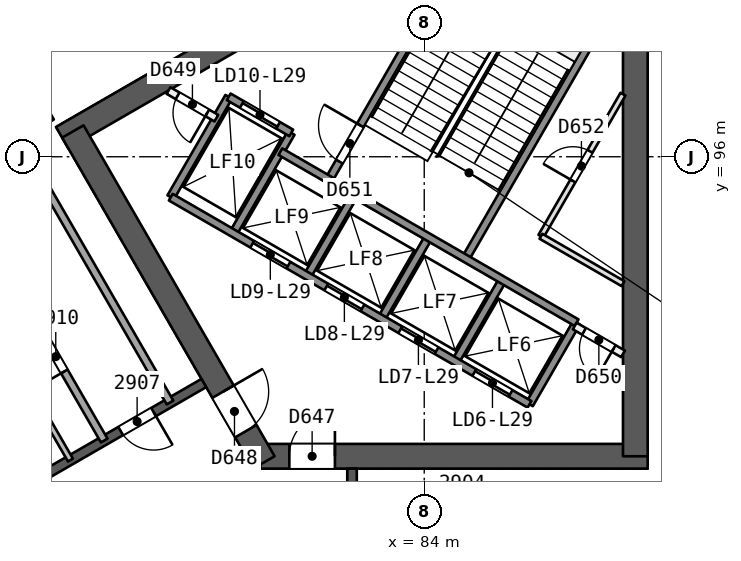
"""IFC4 building model, lengths in metres.
Left out: names, types, materials, properties, quantities, classifications, styles, units other than length and angle.
Written with IfcOpenShell. Run it as: python <this file> out.ifc"""

import sys

from ifc_helpers import new_model, si_unit, direction, frame, frame_2d, origin, place, context, subcontext, project, spatial, rectangle, extrude, element, fill, save


model = new_model("IFC4")
c1 = context("Model", 3, precision=1e-05, world=origin(), true_north=direction((0.0, 1.0)))
c2 = subcontext(c1, "Body", "Model", "MODEL_VIEW")
j1 = project(units=[si_unit("LENGTHUNIT", "METRE"), si_unit("PLANEANGLEUNIT", "RADIAN")], contexts=[c1])
p1 = place(None, origin())
s1 = spatial("IfcSite", under=j1, at=p1, CompositionType="ELEMENT")
p2 = place(p1, origin())
s2 = spatial("IfcBuilding", under=s1, at=p2, CompositionType="ELEMENT")
p3 = place(p2, frame((0.0, 0.0, 121.6)))
s3 = spatial("IfcBuildingStorey", under=s2, at=p3, CompositionType="ELEMENT", Elevation=121.6)
p4 = place(p3, frame((79.688, 88.119, 0.0), z_axis=(0.0, 0.0, 1.0), x_axis=(1.0, 0.0, 0.0)))
e1 = element("IfcWall", 1, at=p4, inside=s3, PredefinedType="SHEAR", context=c2, shape_type="SweptSolid", body=[
    extrude(rectangle(XDim=10.192, YDim=0.65, at=frame_2d((5.096, 0.0))), origin(), (0.0, 0.0, 1.0), 3.7),
])
p5 = place(p4, frame((0.762, 0.0, 0.0)))
e2 = element("IfcOpeningElement", 2, at=p5, cuts=e1, PredefinedType="OPENING", context=c2, shape_type="SweptSolid", body=[
    extrude(rectangle(XDim=1.2, YDim=2.1, at=frame_2d((0.6, 1.05))), frame((0.0, 0.335, 0.0), z_axis=(0.0, -1.0, 0.0), x_axis=(1.0, 0.0, 0.0)), (0.0, 0.0, 1.0), 0.671),
])
p6 = place(p3, frame((89.555, 88.119, 0.0), z_axis=(0.0, 0.0, 1.0), x_axis=(0.0, 1.0, 0.0)))
e3 = element("IfcWall", 3, at=p6, inside=s3, PredefinedType="SHEAR", context=c2, shape_type="SweptSolid", body=[
    extrude(rectangle(XDim=14.009, YDim=0.65, at=frame_2d((7.004, 0.0))), origin(), (0.0, 0.0, 1.0), 3.7),
])
p7 = place(p3, frame((86.723, 103.575, 0.0), z_axis=(0.0, 0.0, 1.0), x_axis=(-0.866031824457, -0.499988878904, 0.0)))
e4 = element("IfcWall", 4, at=p7, inside=s3, PredefinedType="SHEAR", context=c2, shape_type="SweptSolid", body=[
    extrude(rectangle(XDim=14.146, YDim=0.65, at=frame_2d((7.073, 0.0))), origin(), (0.0, 0.0, 1.0), 3.7),
])
p8 = place(p3, frame((74.754, 96.665, 0.0), z_axis=(0.0, 0.0, 1.0), x_axis=(0.500011799426, -0.866018591275, 0.0)))
e5 = element("IfcWall", 5, at=p8, inside=s3, PredefinedType="SHEAR", context=c2, shape_type="SweptSolid", body=[
    extrude(rectangle(XDim=10.055, YDim=0.65, at=frame_2d((5.027, 0.0))), origin(), (0.0, 0.0, 1.0), 3.7),
])
p9 = place(p8, frame((7.905, 0.0, 0.0)))
e6 = element("IfcOpeningElement", 6, at=p9, cuts=e5, PredefinedType="OPENING", context=c2, shape_type="SweptSolid", body=[
    extrude(rectangle(XDim=1.2, YDim=2.1, at=frame_2d((0.6, 1.05))), frame((0.0, 0.335, 0.0), z_axis=(0.0, -1.0, 0.0), x_axis=(1.0, 0.0, 0.0)), (0.0, 0.0, 1.0), 0.671),
])
p10 = place(p3, frame((82.1, 72.206, 0.0), z_axis=(0.0, 0.0, 1.0), x_axis=(0.0, 1.0, 0.0)))
e7 = element("IfcWall", 7, at=p10, inside=s3, PredefinedType="SHEAR", context=c2, shape_type="SweptSolid", body=[
    extrude(rectangle(XDim=15.588, YDim=0.25, at=frame_2d((7.794, 0.0))), origin(), (0.0, 0.0, 1.0), 3.25),
])
p11 = place(p10, frame((2.206, 0.0, 0.0)))
e8 = element("IfcOpeningElement", 8, at=p11, cuts=e7, PredefinedType="OPENING", context=c2, shape_type="SweptSolid", body=[
    extrude(rectangle(XDim=1.2, YDim=2.4, at=frame_2d((0.6, 1.2))), frame((0.0, 0.135, 0.0), z_axis=(0.0, -1.0, 0.0), x_axis=(1.0, 0.0, 0.0)), (0.0, 0.0, 1.0), 0.271),
])
p12 = place(p10, frame((8.003, 0.0, 0.0)))
e9 = element("IfcOpeningElement", 9, at=p12, cuts=e7, PredefinedType="OPENING", context=c2, shape_type="SweptSolid", body=[
    extrude(rectangle(XDim=1.1, YDim=2.1, at=frame_2d((0.55, 1.05))), frame((0.0, 0.135, 0.0), z_axis=(0.0, -1.0, 0.0), x_axis=(1.0, 0.0, 0.0)), (0.0, 0.0, 1.0), 0.271),
])
p13 = place(p10, frame((9.871, 0.0, 0.0)))
e10 = element("IfcOpeningElement", 10, at=p13, cuts=e7, PredefinedType="OPENING", context=c2, shape_type="SweptSolid", body=[
    extrude(rectangle(XDim=1.0, YDim=2.1, at=frame_2d((0.5, 1.05))), frame((0.0, 0.135, 0.0), z_axis=(0.0, -1.0, 0.0), x_axis=(1.0, 0.0, 0.0)), (0.0, 0.0, 1.0), 0.271),
])
p14 = place(p3, frame((78.2, 90.046, 0.0), z_axis=(0.0, 0.0, 1.0), x_axis=(-0.866026492143, -0.499998114903, 0.0)))
e11 = element("IfcWall", 11, at=p14, inside=s3, PredefinedType="SHEAR", context=c2, shape_type="SweptSolid", body=[
    extrude(rectangle(XDim=15.588, YDim=0.25, at=frame_2d((7.794, 0.0))), origin(), (0.0, 0.0, 1.0), 3.25),
])
p15 = place(p14, frame((1.527, 0.0, 0.0)))
e12 = element("IfcOpeningElement", 12, at=p15, cuts=e11, PredefinedType="OPENING", context=c2, shape_type="SweptSolid", body=[
    extrude(rectangle(XDim=1.0, YDim=2.1, at=frame_2d((0.5, 1.05))), frame((0.0, 0.135, 0.0), z_axis=(0.0, -1.0, 0.0), x_axis=(1.0, 0.0, 0.0)), (0.0, 0.0, 1.0), 0.271),
])
p16 = place(p14, frame((8.694, 0.0, 0.0)))
e13 = element("IfcOpeningElement", 13, at=p16, cuts=e11, PredefinedType="OPENING", context=c2, shape_type="SweptSolid", body=[
    extrude(rectangle(XDim=1.1, YDim=2.1, at=frame_2d((0.55, 1.05))), frame((0.0, 0.135, 0.0), z_axis=(0.0, -1.0, 0.0), x_axis=(1.0, 0.0, 0.0)), (0.0, 0.0, 1.0), 0.271),
])
p17 = place(p14, frame((13.062, 0.0, 0.0)))
e14 = element("IfcOpeningElement", 14, at=p17, cuts=e11, PredefinedType="OPENING", context=c2, shape_type="SweptSolid", body=[
    extrude(rectangle(XDim=1.0, YDim=2.1, at=frame_2d((0.5, 1.05))), frame((0.0, 0.135, 0.0), z_axis=(0.0, -1.0, 0.0), x_axis=(1.0, 0.0, 0.0)), (0.0, 0.0, 1.0), 0.271),
])
p18 = place(p3, frame((85.0, 87.595, 0.0), z_axis=(0.0, 0.0, 1.0), x_axis=(0.0, -1.0, 0.0)))
e15 = element("IfcWall", 15, at=p18, inside=s3, PredefinedType="PARTITIONING", context=c2, shape_type="SweptSolid", body=[
    extrude(rectangle(XDim=2.401, YDim=0.15, at=frame_2d((1.2, 0.0))), origin(), (0.0, 0.0, 1.0), 3.25),
])
p19 = place(p18, frame((0.801, 0.0, 0.0)))
e16 = element("IfcOpeningElement", 16, at=p19, cuts=e15, PredefinedType="OPENING", context=c2, shape_type="SweptSolid", body=[
    extrude(rectangle(XDim=0.8, YDim=2.1, at=frame_2d((0.4, 1.05))), frame((0.0, 0.085, 0.0), z_axis=(0.0, -1.0, 0.0), x_axis=(1.0, 0.0, 0.0)), (0.0, 0.0, 1.0), 0.171),
])
p20 = place(p3, frame((74.21, 96.956, 0.0), z_axis=(0.0, 0.0, 1.0), x_axis=(-0.499956595832, 0.866050461743, 0.0)))
e17 = element("IfcWall", 17, at=p20, inside=s3, PredefinedType="PARTITIONING", context=c2, shape_type="SweptSolid", body=[
    extrude(rectangle(XDim=4.423, YDim=0.1, at=frame_2d((2.211, 0.0))), origin(), (0.0, 0.0, 1.0), 3.25),
])
p21 = place(p20, frame((1.761, 0.0, 0.0)))
e18 = element("IfcOpeningElement", 18, at=p21, cuts=e17, PredefinedType="OPENING", context=c2, shape_type="SweptSolid", body=[
    extrude(rectangle(XDim=0.9, YDim=2.1, at=frame_2d((0.45, 1.05))), frame((0.0, 0.061, 0.0), z_axis=(0.0, -1.0, 0.0), x_axis=(1.0, 0.0, 0.0)), (0.0, 0.0, 1.0), 0.121),
])
p22 = place(p3, frame((75.579, 88.533, 0.0), z_axis=(0.0, 0.0, 1.0), x_axis=(-0.5000018851, 0.866024315419, 0.0)))
e19 = element("IfcWall", 19, at=p22, inside=s3, PredefinedType="PARTITIONING", context=c2, shape_type="SweptSolid", body=[
    extrude(rectangle(XDim=9.0, YDim=0.2, at=frame_2d((4.5, 0.0))), origin(), (0.0, 0.0, 1.0), 3.25),
])
p23 = place(p22, frame((2.1, 0.0, 0.0)))
e20 = element("IfcOpeningElement", 20, at=p23, cuts=e19, PredefinedType="OPENING", context=c2, shape_type="SweptSolid", body=[
    extrude(rectangle(XDim=0.9, YDim=2.1, at=frame_2d((0.45, 1.05))), frame((0.0, 0.11, 0.0), z_axis=(0.0, -1.0, 0.0), x_axis=(1.0, 0.0, 0.0)), (0.0, 0.0, 1.0), 0.221),
])
p24 = place(p3, frame((72.811, 97.327, 0.0), z_axis=(0.0, 0.0, 1.0), x_axis=(0.5000018851, -0.866024315419, 0.0)))
e21 = element("IfcWall", 21, at=p24, inside=s3, PredefinedType="PARTITIONING", context=c2, shape_type="SweptSolid", body=[
    extrude(rectangle(XDim=9.0, YDim=0.2, at=frame_2d((4.5, 0.0))), origin(), (0.0, 0.0, 1.0), 3.25),
])
p25 = place(p3, frame((73.19, 90.617, 0.0), z_axis=(0.0, 0.0, 1.0), x_axis=(0.499990139034, -0.866031096941, 0.0)))
e22 = element("IfcWall", 22, at=p25, inside=s3, PredefinedType="PARTITIONING", context=c2, shape_type="SweptSolid", body=[
    extrude(rectangle(XDim=3.0, YDim=0.15, at=frame_2d((1.5, 0.0))), origin(), (0.0, 0.0, 1.0), 3.25),
])
p26 = place(p3, frame((40.706, 82.891, 0.0), z_axis=(0.0, 0.0, 1.0), x_axis=(0.866024855185, 0.5000009502, 0.0)))
e23 = element("IfcWall", 23, at=p26, inside=s3, PredefinedType="SOLIDWALL", context=c2, shape_type="SweptSolid", body=[
    extrude(rectangle(XDim=56.508, YDim=0.3, at=frame_2d((28.254, 0.0))), origin(), (0.0, 0.0, 1.0), 3.25),
])
p27 = place(p26, frame((27.054, 0.0, 0.0)))
e24 = element("IfcOpeningElement", 24, at=p27, cuts=e23, PredefinedType="OPENING", context=c2, shape_type="SweptSolid", body=[
    extrude(rectangle(XDim=2.4, YDim=2.4, at=frame_2d((1.2, 1.2))), frame((0.0, 0.161, 0.0), z_axis=(0.0, -1.0, 0.0), x_axis=(1.0, 0.0, 0.0)), (0.0, 0.0, 1.0), 0.321),
])
p28 = place(p26, frame((32.822, 0.0, 0.0)))
e25 = element("IfcOpeningElement", 25, at=p28, cuts=e23, PredefinedType="OPENING", context=c2, shape_type="SweptSolid", body=[
    extrude(rectangle(XDim=2.4, YDim=2.4, at=frame_2d((1.2, 1.2))), frame((0.0, 0.161, 0.0), z_axis=(0.0, -1.0, 0.0), x_axis=(1.0, 0.0, 0.0)), (0.0, 0.0, 1.0), 0.321),
])
p29 = place(p26, frame((43.875, 0.0, 0.0)))
e26 = element("IfcOpeningElement", 26, at=p29, cuts=e23, PredefinedType="OPENING", context=c2, shape_type="SweptSolid", body=[
    extrude(rectangle(XDim=2.4, YDim=2.4, at=frame_2d((1.2, 1.2))), frame((0.0, 0.161, 0.0), z_axis=(0.0, -1.0, 0.0), x_axis=(1.0, 0.0, 0.0)), (0.0, 0.0, 1.0), 0.321),
])
p30 = place(p26, frame((21.286, 0.0, 0.0)))
e27 = element("IfcOpeningElement", 27, at=p30, cuts=e23, PredefinedType="OPENING", context=c2, shape_type="SweptSolid", body=[
    extrude(rectangle(XDim=2.4, YDim=2.4, at=frame_2d((1.2, 1.2))), frame((0.0, 0.161, 0.0), z_axis=(0.0, -1.0, 0.0), x_axis=(1.0, 0.0, 0.0)), (0.0, 0.0, 1.0), 0.321),
])
p31 = place(p26, frame((10.251, 0.0, 0.0)))
e28 = element("IfcOpeningElement", 28, at=p31, cuts=e23, PredefinedType="OPENING", context=c2, shape_type="SweptSolid", body=[
    extrude(rectangle(XDim=2.4, YDim=2.4, at=frame_2d((1.2, 1.2))), frame((0.0, 0.161, 0.0), z_axis=(0.0, -1.0, 0.0), x_axis=(1.0, 0.0, 0.0)), (0.0, 0.0, 1.0), 0.321),
])
p32 = place(p3, frame((86.77, 89.486, 0.0), z_axis=(0.0, 0.0, 1.0), x_axis=(0.499961042966, 0.86604789447, 0.0)))
e29 = element("IfcWall", 29, at=p32, inside=s3, PredefinedType="SOLIDWALL", context=c2, shape_type="SweptSolid", body=[
    extrude(rectangle(XDim=2.48, YDim=0.2, at=frame_2d((1.24, 0.0))), origin(), (0.0, 0.0, 1.0), 3.25),
])
p33 = place(p3, frame((87.071, 93.908, 0.0), z_axis=(0.0, 0.0, 1.0), x_axis=(0.500012861172, 0.866017978256, 0.0)))
e30 = element("IfcWall", 30, at=p33, inside=s3, PredefinedType="PARTITIONING", context=c2, shape_type="SweptSolid", body=[
    extrude(rectangle(XDim=4.318, YDim=0.15, at=frame_2d((2.159, 0.0))), origin(), (0.0, 0.0, 1.0), 3.25),
])
p34 = place(p33, frame((1.681, 0.0, 0.0)))
e31 = element("IfcOpeningElement", 31, at=p34, cuts=e30, PredefinedType="OPENING", context=c2, shape_type="SweptSolid", body=[
    extrude(rectangle(XDim=0.9, YDim=2.1, at=frame_2d((0.45, 1.05))), frame((0.0, 0.085, 0.0), z_axis=(0.0, -1.0, 0.0), x_axis=(1.0, 0.0, 0.0)), (0.0, 0.0, 1.0), 0.171),
])
p35 = place(p3, frame((84.821, 90.611, 0.0), z_axis=(0.0, 0.0, 1.0), x_axis=(0.499961042966, 0.86604789447, 0.0)))
e32 = element("IfcWall", 32, at=p35, inside=s3, PredefinedType="SOLIDWALL", context=c2, shape_type="SweptSolid", body=[
    extrude(rectangle(XDim=2.48, YDim=0.2, at=frame_2d((1.24, 0.0))), origin(), (0.0, 0.0, 1.0), 3.25),
])
p36 = place(p3, frame((85.087, 93.321, 0.0), z_axis=(0.0, 0.0, 1.0), x_axis=(0.500019787375, 0.866013979237, 0.0)))
e33 = element("IfcWall", 33, at=p36, inside=s3, PredefinedType="SOLIDWALL", context=c2, shape_type="SweptSolid", body=[
    extrude(rectangle(XDim=7.7, YDim=0.2, at=frame_2d((3.85, 0.0))), origin(), (0.0, 0.0, 1.0), 3.25),
])
for number, where, z_axis, x_axis in (
    (34, (82.873, 91.736, 0.0), (0.0, 0.0, 1.0), (0.5, 0.866, 0.0)),
    (35, (80.924, 92.861, 0.0), (0.0, 0.0, 1.0), (0.5, 0.866, 0.0)),
):
    element("IfcWall", number, at=place(p3, frame(where, z_axis=z_axis, x_axis=x_axis)), inside=s3, PredefinedType="SOLIDWALL", context=c2, shape_type="SweptSolid", body=[
        extrude(rectangle(XDim=2.48, YDim=0.2, at=frame_2d((1.24, 0.0))), origin(), (0.0, 0.0, 1.0), 3.25),
    ])
p37 = place(p3, frame((81.493, 95.396, 0.0), z_axis=(0.0, 0.0, 1.0), x_axis=(0.500006057782, 0.866021906294, 0.0)))
e36 = element("IfcWall", 36, at=p37, inside=s3, PredefinedType="SOLIDWALL", context=c2, shape_type="SweptSolid", body=[
    extrude(rectangle(XDim=7.7, YDim=0.2, at=frame_2d((3.85, 0.0))), origin(), (0.0, 0.0, 1.0), 3.25),
])
p38 = place(p37, frame((0.55, 0.0, 0.0)))
e37 = element("IfcOpeningElement", 37, at=p38, cuts=e36, PredefinedType="OPENING", context=c2, shape_type="SweptSolid", body=[
    extrude(rectangle(XDim=1.1, YDim=2.1, at=frame_2d((0.55, 1.05))), frame((0.0, 0.11, 0.0), z_axis=(0.0, -1.0, 0.0), x_axis=(1.0, 0.0, 0.0)), (0.0, 0.0, 1.0), 0.221),
])
for number, where, z_axis, x_axis in (
    (38, (78.976, 93.986, 0.0), (0.0, 0.0, 1.0), (0.5, 0.866, 0.0)),
    (39, (77.33, 94.936, 0.0), (0.0, 0.0, 1.0), (0.5, 0.866, 0.0)),
):
    element("IfcWall", number, at=place(p3, frame(where, z_axis=z_axis, x_axis=x_axis)), inside=s3, PredefinedType="SOLIDWALL", context=c2, shape_type="SweptSolid", body=[
        extrude(rectangle(XDim=3.05, YDim=0.2, at=frame_2d((1.525, 0.0))), origin(), (0.0, 0.0, 1.0), 3.25),
    ])
p39 = place(p3, frame((86.77, 89.486, 0.0), z_axis=(0.0, 0.0, 1.0), x_axis=(-0.86601811187, 0.500012629753, 0.0)))
e40 = element("IfcWall", 40, at=p39, inside=s3, PredefinedType="SOLIDWALL", context=c2, shape_type="SweptSolid", body=[
    extrude(rectangle(XDim=10.9, YDim=0.2, at=frame_2d((5.45, 0.0))), origin(), (0.0, 0.0, 1.0), 3.25),
])
p40 = place(p39, frame((0.575, 0.0, 0.0)))
e41 = element("IfcOpeningElement", 41, at=p40, cuts=e40, PredefinedType="OPENING", context=c2, shape_type="SweptSolid", body=[
    extrude(rectangle(XDim=1.1, YDim=2.1, at=frame_2d((0.55, 1.05))), frame((0.0, 0.11, 0.0), z_axis=(0.0, -1.0, 0.0), x_axis=(1.0, 0.0, 0.0)), (0.0, 0.0, 1.0), 0.221),
])
p41 = place(p39, frame((2.825, 0.0, 0.0)))
e42 = element("IfcOpeningElement", 42, at=p41, cuts=e40, PredefinedType="OPENING", context=c2, shape_type="SweptSolid", body=[
    extrude(rectangle(XDim=1.1, YDim=2.1, at=frame_2d((0.55, 1.05))), frame((0.0, 0.11, 0.0), z_axis=(0.0, -1.0, 0.0), x_axis=(1.0, 0.0, 0.0)), (0.0, 0.0, 1.0), 0.221),
])
p42 = place(p39, frame((5.075, 0.0, 0.0)))
e43 = element("IfcOpeningElement", 43, at=p42, cuts=e40, PredefinedType="OPENING", context=c2, shape_type="SweptSolid", body=[
    extrude(rectangle(XDim=1.1, YDim=2.1, at=frame_2d((0.55, 1.05))), frame((0.0, 0.11, 0.0), z_axis=(0.0, -1.0, 0.0), x_axis=(1.0, 0.0, 0.0)), (0.0, 0.0, 1.0), 0.221),
])
p43 = place(p39, frame((7.325, 0.0, 0.0)))
e44 = element("IfcOpeningElement", 44, at=p43, cuts=e40, PredefinedType="OPENING", context=c2, shape_type="SweptSolid", body=[
    extrude(rectangle(XDim=1.1, YDim=2.1, at=frame_2d((0.55, 1.05))), frame((0.0, 0.11, 0.0), z_axis=(0.0, -1.0, 0.0), x_axis=(1.0, 0.0, 0.0)), (0.0, 0.0, 1.0), 0.221),
])
p44 = place(p3, frame((89.23, 90.814, 0.0), z_axis=(0.0, 0.0, 1.0), x_axis=(-0.866022048785, 0.500005810984, 0.0)))
e45 = element("IfcWall", 45, at=p44, inside=s3, PredefinedType="PARTITIONING", context=c2, shape_type="SweptSolid", body=[
    extrude(rectangle(XDim=1.467, YDim=0.2, at=frame_2d((0.733, 0.0))), origin(), (0.0, 0.0, 1.0), 3.25),
])
p45 = place(p44, frame((0.283, 0.0, 0.0)))
e46 = element("IfcOpeningElement", 46, at=p45, cuts=e45, PredefinedType="OPENING", context=c2, shape_type="SweptSolid", body=[
    extrude(rectangle(XDim=0.9, YDim=2.1, at=frame_2d((0.45, 1.05))), frame((0.0, 0.11, 0.0), z_axis=(0.0, -1.0, 0.0), x_axis=(1.0, 0.0, 0.0)), (0.0, 0.0, 1.0), 0.221),
])
p46 = place(p3, frame((78.53, 97.014, 0.0), z_axis=(0.0, 0.0, 1.0), x_axis=(-0.866045896294, 0.499964504253, 0.0)))
e47 = element("IfcWall", 47, at=p46, inside=s3, PredefinedType="PARTITIONING", context=c2, shape_type="SweptSolid", body=[
    extrude(rectangle(XDim=1.455, YDim=0.2, at=frame_2d((0.728, 0.0))), origin(), (0.0, 0.0, 1.0), 3.25),
])
p47 = place(p46, frame((0.278, 0.0, 0.0)))
e48 = element("IfcOpeningElement", 48, at=p47, cuts=e47, PredefinedType="OPENING", context=c2, shape_type="SweptSolid", body=[
    extrude(rectangle(XDim=0.9, YDim=2.1, at=frame_2d((0.45, 1.05))), frame((0.0, 0.11, 0.0), z_axis=(0.0, -1.0, 0.0), x_axis=(1.0, 0.0, 0.0)), (0.0, 0.0, 1.0), 0.221),
])
p48 = place(p3, frame((88.01, 91.634, 0.0), z_axis=(0.0, 0.0, 1.0), x_axis=(-0.866024315419, 0.5000018851, 0.0)))
e49 = element("IfcWall", 49, at=p48, inside=s3, PredefinedType="SOLIDWALL", context=c2, shape_type="SweptSolid", body=[
    extrude(rectangle(XDim=9.0, YDim=0.2, at=frame_2d((4.5, 0.0))), origin(), (0.0, 0.0, 1.0), 3.25),
])
p49 = place(p3, frame((80.5, 96.627, 0.0), z_axis=(0.0, 0.0, 1.0), x_axis=(-0.86601224135, 0.500022797313, 0.0)))
e50 = element("IfcWall", 50, at=p49, inside=s3, PredefinedType="SOLIDWALL", context=c2, shape_type="SweptSolid", body=[
    extrude(rectangle(XDim=1.9, YDim=0.2, at=frame_2d((0.95, 0.0))), origin(), (0.0, 0.0, 1.0), 3.25),
])
p50 = place(p49, frame((0.4, 0.0, 0.0)))
e51 = element("IfcOpeningElement", 51, at=p50, cuts=e50, PredefinedType="OPENING", context=c2, shape_type="SweptSolid", body=[
    extrude(rectangle(XDim=1.1, YDim=2.1, at=frame_2d((0.55, 1.05))), frame((0.0, 0.11, 0.0), z_axis=(0.0, -1.0, 0.0), x_axis=(1.0, 0.0, 0.0)), (0.0, 0.0, 1.0), 0.221),
])
p51 = place(p3, frame((89.23, 92.661, 0.0), z_axis=(0.0, 0.0, 1.0), x_axis=(-0.866046964233, 0.499962654349, 0.0)))
e52 = element("IfcWall", 52, at=p51, inside=s3, PredefinedType="PARTITIONING", context=c2, shape_type="SweptSolid", body=[
    extrude(rectangle(XDim=2.493, YDim=0.15, at=frame_2d((1.247, 0.0))), origin(), (0.0, 0.0, 1.0), 3.25),
])
p52 = place(p15, origin())
e53 = element("IfcDoor", 53, at=p52, inside=s3, OperationType="SINGLE_SWING_LEFT", PredefinedType="NOTDEFINED", context=c2, shape_type="SweptSolid", body=[
    extrude(rectangle(XDim=1.0, YDim=2.1, at=frame_2d((0.5, 1.05))), frame((0.0, 0.025, 0.0), z_axis=(0.0, -1.0, 0.0), x_axis=(1.0, 0.0, 0.0)), (0.0, 0.0, 1.0), 0.05),
])
fill(e12, e53)
p53 = place(p23, origin())
e54 = element("IfcDoor", 54, at=p53, inside=s3, OperationType="SINGLE_SWING_LEFT", PredefinedType="NOTDEFINED", context=c2, shape_type="SweptSolid", body=[
    extrude(rectangle(XDim=0.9, YDim=2.1, at=frame_2d((0.45, 1.05))), frame((0.0, 0.025, 0.0), z_axis=(0.0, -1.0, 0.0), x_axis=(1.0, 0.0, 0.0)), (0.0, 0.0, 1.0), 0.05),
])
fill(e20, e54)
p54 = place(p5, origin())
e55 = element("IfcDoor", 55, at=p54, inside=s3, OperationType="SINGLE_SWING_RIGHT", PredefinedType="NOTDEFINED", context=c2, shape_type="SweptSolid", body=[
    extrude(rectangle(XDim=1.2, YDim=2.1, at=frame_2d((0.6, 1.05))), frame((0.0, 0.025, 0.0), z_axis=(0.0, -1.0, 0.0), x_axis=(1.0, 0.0, 0.0)), (0.0, 0.0, 1.0), 0.05),
])
fill(e2, e55)
p55 = place(p9, origin())
e56 = element("IfcDoor", 56, at=p55, inside=s3, OperationType="SINGLE_SWING_LEFT", PredefinedType="NOTDEFINED", context=c2, shape_type="SweptSolid", body=[
    extrude(rectangle(XDim=1.2, YDim=2.1, at=frame_2d((0.6, 1.05))), frame((0.0, 0.025, 0.0), z_axis=(0.0, -1.0, 0.0), x_axis=(1.0, 0.0, 0.0)), (0.0, 0.0, 1.0), 0.05),
])
fill(e6, e56)
p56 = place(p40, origin())
e57 = element("IfcDoor", 57, at=p56, inside=s3, OperationType="SLIDING_TO_RIGHT", PredefinedType="NOTDEFINED", context=c2, shape_type="SweptSolid", body=[
    extrude(rectangle(XDim=1.1, YDim=2.1, at=frame_2d((0.55, 1.05))), frame((0.0, 0.025, 0.0), z_axis=(0.0, -1.0, 0.0), x_axis=(1.0, 0.0, 0.0)), (0.0, 0.0, 1.0), 0.05),
])
fill(e41, e57)
p57 = place(p41, origin())
e58 = element("IfcDoor", 58, at=p57, inside=s3, OperationType="SLIDING_TO_LEFT", PredefinedType="NOTDEFINED", context=c2, shape_type="SweptSolid", body=[
    extrude(rectangle(XDim=1.1, YDim=2.1, at=frame_2d((0.55, 1.05))), frame((0.0, 0.025, 0.0), z_axis=(0.0, -1.0, 0.0), x_axis=(1.0, 0.0, 0.0)), (0.0, 0.0, 1.0), 0.05),
])
fill(e42, e58)
p58 = place(p42, origin())
e59 = element("IfcDoor", 59, at=p58, inside=s3, OperationType="SLIDING_TO_RIGHT", PredefinedType="NOTDEFINED", context=c2, shape_type="SweptSolid", body=[
    extrude(rectangle(XDim=1.1, YDim=2.1, at=frame_2d((0.55, 1.05))), frame((0.0, 0.025, 0.0), z_axis=(0.0, -1.0, 0.0), x_axis=(1.0, 0.0, 0.0)), (0.0, 0.0, 1.0), 0.05),
])
fill(e43, e59)
p59 = place(p43, origin())
e60 = element("IfcDoor", 60, at=p59, inside=s3, OperationType="SLIDING_TO_LEFT", PredefinedType="NOTDEFINED", context=c2, shape_type="SweptSolid", body=[
    extrude(rectangle(XDim=1.1, YDim=2.1, at=frame_2d((0.55, 1.05))), frame((0.0, 0.025, 0.0), z_axis=(0.0, -1.0, 0.0), x_axis=(1.0, 0.0, 0.0)), (0.0, 0.0, 1.0), 0.05),
])
fill(e44, e60)
p60 = place(p50, origin())
e61 = element("IfcDoor", 61, at=p60, inside=s3, OperationType="SLIDING_TO_RIGHT", PredefinedType="NOTDEFINED", context=c2, shape_type="SweptSolid", body=[
    extrude(rectangle(XDim=1.1, YDim=2.1, at=frame_2d((0.55, 1.05))), frame((0.0, 0.025, 0.0), z_axis=(0.0, -1.0, 0.0), x_axis=(1.0, 0.0, 0.0)), (0.0, 0.0, 1.0), 0.05),
])
fill(e51, e61)
p61 = place(p47, origin())
e62 = element("IfcDoor", 62, at=p61, inside=s3, OperationType="SINGLE_SWING_LEFT", PredefinedType="NOTDEFINED", context=c2, shape_type="SweptSolid", body=[
    extrude(rectangle(XDim=0.9, YDim=2.1, at=frame_2d((0.45, 1.05))), frame((0.0, 0.025, 0.0), z_axis=(0.0, -1.0, 0.0), x_axis=(1.0, 0.0, 0.0)), (0.0, 0.0, 1.0), 0.05),
])
fill(e48, e62)
p62 = place(p45, origin())
e63 = element("IfcDoor", 63, at=p62, inside=s3, OperationType="SINGLE_SWING_LEFT", PredefinedType="NOTDEFINED", context=c2, shape_type="SweptSolid", body=[
    extrude(rectangle(XDim=0.9, YDim=2.1, at=frame_2d((0.45, 1.05))), frame((0.0, 0.025, 0.0), z_axis=(0.0, -1.0, 0.0), x_axis=(1.0, 0.0, 0.0)), (0.0, 0.0, 1.0), 0.05),
])
fill(e46, e63)
p63 = place(p38, origin())
e64 = element("IfcDoor", 64, at=p63, inside=s3, OperationType="SINGLE_SWING_RIGHT", PredefinedType="NOTDEFINED", context=c2, shape_type="SweptSolid", body=[
    extrude(rectangle(XDim=1.1, YDim=2.1, at=frame_2d((0.55, 1.05))), frame((0.0, 0.025, 0.0), z_axis=(0.0, -1.0, 0.0), x_axis=(1.0, 0.0, 0.0)), (0.0, 0.0, 1.0), 0.05),
])
fill(e37, e64)
p64 = place(p34, origin())
e65 = element("IfcDoor", 65, at=p64, inside=s3, OperationType="SINGLE_SWING_LEFT", PredefinedType="NOTDEFINED", context=c2, shape_type="SweptSolid", body=[
    extrude(rectangle(XDim=0.9, YDim=2.1, at=frame_2d((0.45, 1.05))), frame((0.0, 0.025, 0.0), z_axis=(0.0, -1.0, 0.0), x_axis=(1.0, 0.0, 0.0)), (0.0, 0.0, 1.0), 0.05),
])
fill(e31, e65)
save(model, sys.argv[1])
